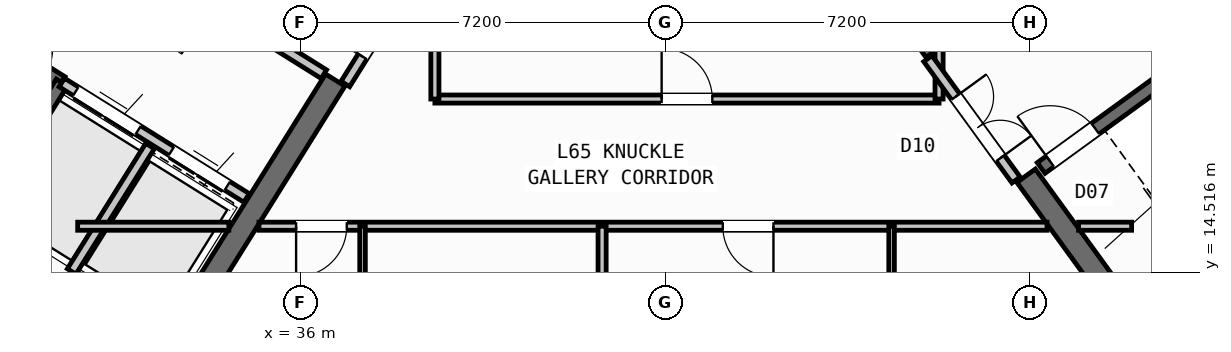
"""IFC4 building model, lengths in metres.
Left out: names, types, materials, properties, quantities, classifications, styles, units other than length and angle.
Written with IfcOpenShell. Run it as: python <this file> out.ifc"""

import sys

from ifc_helpers import new_model, si_unit, direction, frame, frame_2d, origin, place, context, subcontext, project, spatial, rectangle, extrude, source, transform, mapped, element, fill, save


model = new_model("IFC4")
c1 = context("Model", 3, precision=1e-05, world=origin(), true_north=direction((0.0, 1.0)))
c2 = subcontext(c1, "Body", "Model", "MODEL_VIEW")
j1 = project(units=[si_unit("LENGTHUNIT", "METRE"), si_unit("PLANEANGLEUNIT", "RADIAN")], contexts=[c1])
p1 = place(None, origin())
s1 = spatial("IfcSite", under=j1, at=p1, CompositionType="ELEMENT")
p2 = place(p1, origin())
s2 = spatial("IfcBuilding", under=s1, at=p2, CompositionType="ELEMENT")
p3 = place(p2, frame((0.0, 0.0, 259.2)))
s3 = spatial("IfcBuildingStorey", under=s2, at=p3, CompositionType="ELEMENT", Elevation=259.2)
p4 = place(p3, frame((33.324, 12.503, 0.0), z_axis=(0.0, 0.0, 1.0), x_axis=(-0.848043529849, 0.529926571782, 0.0)))
e1 = element("IfcWall", 1, at=p4, inside=s3, PredefinedType="SHEAR", context=c2, shape_type="SweptSolid", body=[
    extrude(rectangle(XDim=13.04, YDim=0.45, at=frame_2d((6.52, 0.0))), origin(), (0.0, 0.0, 1.0), 3.35),
])
p5 = place(p3, frame((36.683, 18.304, 0.0), z_axis=(0.0, 0.0, 1.0), x_axis=(-0.529904039071, -0.848057609704, 0.0)))
e2 = element("IfcWall", 2, at=p5, inside=s3, PredefinedType="SHEAR", context=c2, shape_type="SweptSolid", body=[
    extrude(rectangle(XDim=6.475, YDim=0.45, at=frame_2d((3.238, 0.0))), origin(), (0.0, 0.0, 1.0), 3.35),
])
p6 = place(p3, frame((52.399, 13.169, 0.0), z_axis=(0.0, 0.0, 1.0), x_axis=(0.809022352778, 0.587777877013, 0.0)))
e3 = element("IfcWall", 3, at=p6, inside=s3, PredefinedType="SHEAR", context=c2, shape_type="SweptSolid", body=[
    extrude(rectangle(XDim=12.24, YDim=0.45, at=frame_2d((6.12, 0.0))), origin(), (0.0, 0.0, 1.0), 3.35),
])
p7 = place(p3, frame((52.449, 13.483, 0.0), z_axis=(0.0, 0.0, 1.0), x_axis=(-0.587819244441, 0.808992296542, 0.0)))
e4 = element("IfcWall", 4, at=p7, inside=s3, PredefinedType="SHEAR", context=c2, shape_type="SweptSolid", body=[
    extrude(rectangle(XDim=3.625, YDim=0.45, at=frame_2d((1.812, 0.0))), origin(), (0.0, 0.0, 1.0), 3.35),
])
p8 = place(p3, frame((48.526, 18.884, 0.0), z_axis=(0.0, 0.0, 1.0), x_axis=(-0.587774812919, 0.809024578921, 0.0)))
e5 = element("IfcWall", 5, at=p8, inside=s3, PredefinedType="SHEAR", context=c2, shape_type="SweptSolid", body=[
    extrude(rectangle(XDim=6.475, YDim=0.45, at=frame_2d((3.238, 0.0))), origin(), (0.0, 0.0, 1.0), 3.35),
])
p9 = place(p3, frame((31.28, 18.261, 0.0), z_axis=(0.0, 0.0, 1.0), x_axis=(-0.848051618787, 0.529913626805, 0.0)))
e6 = element("IfcWall", 6, at=p9, inside=s3, PredefinedType="SHEAR", context=c2, shape_type="SweptSolid", body=[
    extrude(rectangle(XDim=7.46, YDim=0.26, at=frame_2d((3.73, 0.0))), origin(), (0.0, 0.0, 1.0), 3.35),
])
p10 = place(p9, frame((0.36, 0.0, 0.0)))
e7 = element("IfcOpeningElement", 7, at=p10, cuts=e6, PredefinedType="OPENING", context=c2, shape_type="SweptSolid", body=[
    extrude(rectangle(XDim=0.86, YDim=2.05, at=frame_2d((0.43, 1.025))), frame((0.0, 0.14, 0.0), z_axis=(0.0, -1.0, 0.0), x_axis=(1.0, 0.0, 0.0)), (0.0, 0.0, 1.0), 0.28),
])
p11 = place(p3, frame((31.288, 18.256, 0.0), z_axis=(0.0, 0.0, 1.0), x_axis=(-0.529943379326, -0.848033026897, 0.0)))
e8 = element("IfcWall", 8, at=p11, inside=s3, PredefinedType="SHEAR", context=c2, shape_type="SweptSolid", body=[
    extrude(rectangle(XDim=3.16, YDim=0.26, at=frame_2d((1.58, 0.0))), origin(), (0.0, 0.0, 1.0), 3.35),
])
p12 = place(p3, frame((34.933, 15.978, 0.0), z_axis=(0.0, 0.0, 1.0), x_axis=(-0.848055739377, 0.529907032327, 0.0)))
e9 = element("IfcWall", 9, at=p12, inside=s3, PredefinedType="STANDARD", context=c2, shape_type="SweptSolid", body=[
    extrude(rectangle(XDim=4.298, YDim=0.2, at=frame_2d((2.149, 0.0))), origin(), (0.0, 0.0, 1.0), 3.34),
])
p13 = place(p12, frame((0.448, 0.0, 0.0)))
e10 = element("IfcOpeningElement", 10, at=p13, cuts=e9, PredefinedType="OPENING", context=c2, shape_type="SweptSolid", body=[
    extrude(rectangle(XDim=1.3, YDim=2.2, at=frame_2d((0.65, 1.1))), frame((0.0, 0.11, 0.0), z_axis=(0.0, -1.0, 0.0), x_axis=(1.0, 0.0, 0.0)), (0.0, 0.0, 1.0), 0.22),
])
p14 = place(p12, frame((2.523, 0.0, 0.0)))
e11 = element("IfcOpeningElement", 11, at=p14, cuts=e9, PredefinedType="OPENING", context=c2, shape_type="SweptSolid", body=[
    extrude(rectangle(XDim=1.45, YDim=2.25, at=frame_2d((0.725, 1.125))), frame((0.0, 0.11, 0.0), z_axis=(0.0, -1.0, 0.0), x_axis=(1.0, 0.0, 0.0)), (0.0, 0.0, 1.0), 0.22),
])
p15 = place(p3, frame((36.459, 18.421, 0.0), z_axis=(0.0, 0.0, 1.0), x_axis=(-0.848059591691, 0.529900867089, 0.0)))
e12 = element("IfcWall", 12, at=p15, inside=s3, PredefinedType="STANDARD", context=c2, shape_type="SweptSolid", body=[
    extrude(rectangle(XDim=5.818, YDim=0.2, at=frame_2d((2.909, 0.0))), origin(), (0.0, 0.0, 1.0), 3.34),
])
p16 = place(p15, frame((2.598, 0.0, 0.0)))
e13 = element("IfcOpeningElement", 13, at=p16, cuts=e12, PredefinedType="OPENING", context=c2, shape_type="SweptSolid", body=[
    extrude(rectangle(XDim=1.15, YDim=2.1, at=frame_2d((0.575, 1.05))), frame((0.0, 0.11, 0.0), z_axis=(0.0, -1.0, 0.0), x_axis=(1.0, 0.0, 0.0)), (0.0, 0.0, 1.0), 0.22),
])
p17 = place(p3, frame((33.029, 17.003, 0.0), z_axis=(0.0, 0.0, 1.0), x_axis=(-0.529916267533, -0.848049968695, 0.0)))
e14 = element("IfcWall", 14, at=p17, inside=s3, PredefinedType="STANDARD", context=c2, shape_type="SweptSolid", body=[
    extrude(rectangle(XDim=2.92, YDim=0.2, at=frame_2d((1.46, 0.0))), origin(), (0.0, 0.0, 1.0), 3.34),
])
p18 = place(p3, frame((52.472, 14.013, 0.0), z_axis=(0.0, 0.0, 1.0), x_axis=(0.809028366311, 0.587769599847, 0.0)))
e15 = element("IfcWall", 15, at=p18, inside=s3, PredefinedType="SHEAR", context=c2, shape_type="SweptSolid", body=[
    extrude(rectangle(XDim=7.33, YDim=0.26, at=frame_2d((3.665, 0.0))), origin(), (0.0, 0.0, 1.0), 3.35),
])
p19 = place(p3, frame((50.615, 16.57, 0.0), z_axis=(0.0, 0.0, 1.0), x_axis=(0.809028366311, 0.587769599847, 0.0)))
e16 = element("IfcWall", 16, at=p19, inside=s3, PredefinedType="SHEAR", context=c2, shape_type="SweptSolid", body=[
    extrude(rectangle(XDim=7.33, YDim=0.26, at=frame_2d((3.665, 0.0))), origin(), (0.0, 0.0, 1.0), 3.35),
])
p20 = place(p19, frame((0.22, 0.0, 0.0)))
e17 = element("IfcOpeningElement", 17, at=p20, cuts=e16, PredefinedType="OPENING", context=c2, shape_type="SweptSolid", body=[
    extrude(rectangle(XDim=1.1, YDim=2.1, at=frame_2d((0.55, 1.05))), frame((0.0, 0.14, 0.0), z_axis=(0.0, -1.0, 0.0), x_axis=(1.0, 0.0, 0.0)), (0.0, 0.0, 1.0), 0.28),
])
p21 = place(p3, frame((32.164, 10.374, 0.0), z_axis=(0.0, 0.0, 1.0), x_axis=(-0.848044107957, 0.529925646633, 0.0)))
e18 = element("IfcWall", 18, at=p21, inside=s3, PredefinedType="PARTITIONING", context=c2, shape_type="SweptSolid", body=[
    extrude(rectangle(XDim=15.57, YDim=0.16, at=frame_2d((7.785, 0.0))), origin(), (0.0, 0.0, 1.0), 3.34),
])
p22 = place(p21, frame((10.83, 0.0, 0.0)))
e19 = element("IfcOpeningElement", 19, at=p22, cuts=e18, PredefinedType="OPENING", context=c2, shape_type="SweptSolid", body=[
    extrude(rectangle(XDim=1.0, YDim=2.1, at=frame_2d((0.5, 1.05))), frame((0.0, 0.09, 0.0), z_axis=(0.0, -1.0, 0.0), x_axis=(1.0, 0.0, 0.0)), (0.0, 0.0, 1.0), 0.18),
])
p23 = place(p3, frame((38.451, 20.737, 0.0), z_axis=(0.0, 0.0, 1.0), x_axis=(-0.529924799939, -0.848044637038, 0.0)))
e20 = element("IfcWall", 20, at=p23, inside=s3, PredefinedType="STANDARD", context=c2, shape_type="SweptSolid", body=[
    extrude(rectangle(XDim=2.96, YDim=0.2, at=frame_2d((1.48, 0.0))), origin(), (0.0, 0.0, 1.0), 3.34),
])
p24 = place(p23, frame((1.46, 0.0, 0.0)))
e21 = element("IfcOpeningElement", 21, at=p24, cuts=e20, PredefinedType="OPENING", context=c2, shape_type="SweptSolid", body=[
    extrude(rectangle(XDim=0.86, YDim=2.05, at=frame_2d((0.43, 1.025))), frame((0.0, 0.11, 0.0), z_axis=(0.0, -1.0, 0.0), x_axis=(1.0, 0.0, 0.0)), (0.0, 0.0, 1.0), 0.22),
])
p25 = place(p3, frame((31.6, 15.42, 0.0), z_axis=(0.0, 0.0, 1.0), x_axis=(1.0, 0.0, 0.0)))
e22 = element("IfcWall", 22, at=p25, inside=s3, PredefinedType="PARTITIONING", context=c2, shape_type="SweptSolid", body=[
    extrude(rectangle(XDim=2.984, YDim=0.16, at=frame_2d((1.492, 0.0))), origin(), (0.0, 0.0, 1.0), 3.34),
])
p26 = place(p3, frame((35.178, 15.42, 0.0), z_axis=(0.0, 0.0, 1.0), x_axis=(1.0, 0.0, 0.0)))
e23 = element("IfcWall", 23, at=p26, inside=s3, PredefinedType="PARTITIONING", context=c2, shape_type="SweptSolid", body=[
    extrude(rectangle(XDim=15.552, YDim=0.16, at=frame_2d((7.776, 0.0))), origin(), (0.0, 0.0, 1.0), 3.34),
])
p27 = place(p26, frame((0.733, 0.0, 0.0)))
e24 = element("IfcOpeningElement", 24, at=p27, cuts=e23, PredefinedType="OPENING", context=c2, shape_type="SweptSolid", body=[
    extrude(rectangle(XDim=1.0, YDim=2.1, at=frame_2d((0.5, 1.05))), frame((0.0, 0.09, 0.0), z_axis=(0.0, -1.0, 0.0), x_axis=(1.0, 0.0, 0.0)), (0.0, 0.0, 1.0), 0.18),
])
p28 = place(p26, frame((9.153, 0.0, 0.0)))
e25 = element("IfcOpeningElement", 25, at=p28, cuts=e23, PredefinedType="OPENING", context=c2, shape_type="SweptSolid", body=[
    extrude(rectangle(XDim=1.0, YDim=2.1, at=frame_2d((0.5, 1.05))), frame((0.0, 0.09, 0.0), z_axis=(0.0, -1.0, 0.0), x_axis=(1.0, 0.0, 0.0)), (0.0, 0.0, 1.0), 0.18),
])
p29 = place(p3, frame((51.354, 15.42, 0.0), z_axis=(0.0, 0.0, 1.0), x_axis=(1.0, 0.0, 0.0)))
e26 = element("IfcWall", 26, at=p29, inside=s3, PredefinedType="PARTITIONING", context=c2, shape_type="SweptSolid", body=[
    extrude(rectangle(XDim=1.046, YDim=0.16, at=frame_2d((0.523, 0.0))), origin(), (0.0, 0.0, 1.0), 3.34),
])
p30 = place(p3, frame((38.65, 17.93, 0.0), z_axis=(0.0, 0.0, 1.0), x_axis=(1.0, 0.0, 0.0)))
e27 = element("IfcWall", 27, at=p30, inside=s3, PredefinedType="PARTITIONING", context=c2, shape_type="SweptSolid", body=[
    extrude(rectangle(XDim=9.95, YDim=0.16, at=frame_2d((4.975, 0.0))), origin(), (0.0, 0.0, 1.0), 3.34),
])
p31 = place(p30, frame((4.475, 0.0, 0.0)))
e28 = element("IfcOpeningElement", 28, at=p31, cuts=e27, PredefinedType="OPENING", context=c2, shape_type="SweptSolid", body=[
    extrude(rectangle(XDim=1.0, YDim=2.1, at=frame_2d((0.5, 1.05))), frame((0.0, 0.09, 0.0), z_axis=(0.0, -1.0, 0.0), x_axis=(1.0, 0.0, 0.0)), (0.0, 0.0, 1.0), 0.18),
])
p32 = place(p3, frame((38.65, 17.93, 0.0), z_axis=(0.0, 0.0, 1.0), x_axis=(0.0, 1.0, 0.0)))
e29 = element("IfcWall", 29, at=p32, inside=s3, PredefinedType="PARTITIONING", context=c2, shape_type="SweptSolid", body=[
    extrude(rectangle(XDim=3.046, YDim=0.16, at=frame_2d((1.523, 0.0))), origin(), (0.0, 0.0, 1.0), 3.34),
])
p33 = place(p3, frame((48.6, 17.93, 0.0), z_axis=(0.0, 0.0, 1.0), x_axis=(0.0, 1.0, 0.0)))
e30 = element("IfcWall", 30, at=p33, inside=s3, PredefinedType="PARTITIONING", context=c2, shape_type="SweptSolid", body=[
    extrude(rectangle(XDim=0.993, YDim=0.16, at=frame_2d((0.496, 0.0))), origin(), (0.0, 0.0, 1.0), 3.34),
])
p34 = place(p3, frame((50.119, 16.333, 0.0), z_axis=(0.0, 0.0, 1.0), x_axis=(-0.587749856981, 0.809042709391, 0.0)))
e31 = element("IfcWall", 31, at=p34, inside=s3, PredefinedType="STANDARD", context=c2, shape_type="SweptSolid", body=[
    extrude(rectangle(XDim=2.96, YDim=0.2, at=frame_2d((1.48, 0.0))), origin(), (0.0, 0.0, 1.0), 3.34),
])
p35 = place(p34, frame((0.53, 0.0, 0.0)))
e32 = element("IfcOpeningElement", 32, at=p35, cuts=e31, PredefinedType="OPENING", context=c2, shape_type="SweptSolid", body=[
    extrude(rectangle(XDim=1.5, YDim=2.15, at=frame_2d((0.75, 1.075))), frame((0.0, 0.11, 0.0), z_axis=(0.0, -1.0, 0.0), x_axis=(1.0, 0.0, 0.0)), (0.0, 0.0, 1.0), 0.22),
])
p36 = place(p3, frame((41.95, 1.96, 0.0), z_axis=(0.0, 0.0, 1.0), x_axis=(0.0, 1.0, 0.0)))
e33 = element("IfcWall", 33, at=p36, inside=s3, PredefinedType="PARTITIONING", context=c2, shape_type="SweptSolid", body=[
    extrude(rectangle(XDim=13.46, YDim=0.16, at=frame_2d((6.73, 0.0))), origin(), (0.0, 0.0, 1.0), 3.34),
])
p37 = place(p3, frame((37.222, 1.96, 0.0), z_axis=(0.0, 0.0, 1.0), x_axis=(0.0, 1.0, 0.0)))
e34 = element("IfcWall", 34, at=p37, inside=s3, PredefinedType="PARTITIONING", context=c2, shape_type="SweptSolid", body=[
    extrude(rectangle(XDim=13.46, YDim=0.11, at=frame_2d((6.73, 0.0))), origin(), (0.0, 0.0, 1.0), 3.34),
])
p38 = place(p37, frame((5.2, 0.0, 0.0)))
e35 = element("IfcOpeningElement", 35, at=p38, cuts=e34, PredefinedType="OPENING", context=c2, shape_type="SweptSolid", body=[
    extrude(rectangle(XDim=0.92, YDim=2.08, at=frame_2d((0.46, 1.04))), frame((0.0, 0.065, 0.0), z_axis=(0.0, -1.0, 0.0), x_axis=(1.0, 0.0, 0.0)), (0.0, 0.0, 1.0), 0.13),
])
p39 = place(p37, frame((10.89, 0.0, 0.0)))
e36 = element("IfcOpeningElement", 36, at=p39, cuts=e34, PredefinedType="OPENING", context=c2, shape_type="SweptSolid", body=[
    extrude(rectangle(XDim=0.88, YDim=2.08, at=frame_2d((0.44, 1.04))), frame((0.0, 0.065, 0.0), z_axis=(0.0, -1.0, 0.0), x_axis=(1.0, 0.0, 0.0)), (0.0, 0.0, 1.0), 0.13),
])
p40 = place(p3, frame((47.663, 1.96, 0.0), z_axis=(0.0, 0.0, 1.0), x_axis=(0.0, 1.0, 0.0)))
e37 = element("IfcWall", 37, at=p40, inside=s3, PredefinedType="PARTITIONING", context=c2, shape_type="SweptSolid", body=[
    extrude(rectangle(XDim=13.46, YDim=0.11, at=frame_2d((6.73, 0.0))), origin(), (0.0, 0.0, 1.0), 3.34),
])
p41 = place(p40, frame((6.3, 0.0, 0.0)))
e38 = element("IfcOpeningElement", 38, at=p41, cuts=e37, PredefinedType="OPENING", context=c2, shape_type="SweptSolid", body=[
    extrude(rectangle(XDim=0.92, YDim=2.08, at=frame_2d((0.46, 1.04))), frame((0.0, 0.065, 0.0), z_axis=(0.0, -1.0, 0.0), x_axis=(1.0, 0.0, 0.0)), (0.0, 0.0, 1.0), 0.13),
])
p42 = place(p40, frame((11.54, 0.0, 0.0)))
e39 = element("IfcOpeningElement", 39, at=p42, cuts=e37, PredefinedType="OPENING", context=c2, shape_type="SweptSolid", body=[
    extrude(rectangle(XDim=0.88, YDim=2.08, at=frame_2d((0.44, 1.04))), frame((0.0, 0.065, 0.0), z_axis=(0.0, -1.0, 0.0), x_axis=(1.0, 0.0, 0.0)), (0.0, 0.0, 1.0), 0.13),
])
m1 = source(origin(), c2, "Body", "SweptSolid", [
    extrude(rectangle(XDim=1.3, YDim=2.2, at=frame_2d((0.65, 1.1))), frame((0.0, 0.025, 0.0), z_axis=(0.0, -1.0, 0.0), x_axis=(1.0, 0.0, 0.0)), (0.0, 0.0, 1.0), 0.05),
])
p43 = place(p13, origin())
e40 = element("IfcDoor", 40, at=p43, inside=s3, OperationType="DOUBLE_DOOR_SLIDING", PredefinedType="DOOR", context=c2, shape_type="MappedRepresentation", body=[
    mapped(m1, transform((0.0, 0.0, 0.0), scale=1.0)),
])
fill(e10, e40)
m2 = source(origin(), c2, "Body", "SweptSolid", [
    extrude(rectangle(XDim=1.45, YDim=2.25, at=frame_2d((0.725, 1.125))), frame((0.0, 0.025, 0.0), z_axis=(0.0, -1.0, 0.0), x_axis=(1.0, 0.0, 0.0)), (0.0, 0.0, 1.0), 0.05),
])
p44 = place(p14, origin())
e41 = element("IfcDoor", 41, at=p44, inside=s3, OperationType="DOUBLE_DOOR_SLIDING", PredefinedType="DOOR", context=c2, shape_type="MappedRepresentation", body=[
    mapped(m2, transform((0.0, 0.0, 0.0), scale=1.0)),
])
fill(e11, e41)
m3 = source(origin(), c2, "Body", "SweptSolid", [
    extrude(rectangle(XDim=1.1, YDim=2.1, at=frame_2d((0.55, 1.05))), frame((0.0, 0.025, 0.0), z_axis=(0.0, -1.0, 0.0), x_axis=(1.0, 0.0, 0.0)), (0.0, 0.0, 1.0), 0.05),
])
p45 = place(p20, origin())
e42 = element("IfcDoor", 42, at=p45, inside=s3, OperationType="SINGLE_SWING_LEFT", PredefinedType="DOOR", context=c2, shape_type="MappedRepresentation", body=[
    mapped(m3, transform((0.0, 0.0, 0.0), scale=1.0)),
])
fill(e17, e42)
m4 = source(origin(), c2, "Body", "SweptSolid", [
    extrude(rectangle(XDim=1.0, YDim=2.1, at=frame_2d((0.5, 1.05))), frame((0.0, 0.025, 0.0), z_axis=(0.0, -1.0, 0.0), x_axis=(1.0, 0.0, 0.0)), (0.0, 0.0, 1.0), 0.05),
])
p46 = place(p31, origin())
e43 = element("IfcDoor", 43, at=p46, inside=s3, OperationType="SINGLE_SWING_LEFT", PredefinedType="DOOR", context=c2, shape_type="MappedRepresentation", body=[
    mapped(m4, transform((0.0, 0.0, 0.0), scale=1.0)),
])
fill(e28, e43)
m5 = source(origin(), c2, "Body", "SweptSolid", [
    extrude(rectangle(XDim=0.86, YDim=2.05, at=frame_2d((0.43, 1.025))), frame((0.0, 0.025, 0.0), z_axis=(0.0, -1.0, 0.0), x_axis=(1.0, 0.0, 0.0)), (0.0, 0.0, 1.0), 0.05),
])
p47 = place(p24, frame((0.86, 0.0, 0.0), z_axis=(0.0, 0.0, 1.0), x_axis=(-1.0, 0.0, 0.0)))
e44 = element("IfcDoor", 44, at=p47, inside=s3, OperationType="SINGLE_SWING_LEFT", PredefinedType="DOOR", context=c2, shape_type="MappedRepresentation", body=[
    mapped(m5, transform((0.0, 0.0, 0.0), scale=1.0)),
])
fill(e21, e44)
m6 = source(origin(), c2, "Body", "SweptSolid", [
    extrude(rectangle(XDim=1.5, YDim=2.15, at=frame_2d((0.75, 1.075))), frame((0.0, 0.025, 0.0), z_axis=(0.0, -1.0, 0.0), x_axis=(1.0, 0.0, 0.0)), (0.0, 0.0, 1.0), 0.05),
])
p48 = place(p35, frame((1.5, 0.0, 0.0), z_axis=(0.0, 0.0, 1.0), x_axis=(-1.0, 0.0, 0.0)))
e45 = element("IfcDoor", 45, at=p48, inside=s3, OperationType="DOUBLE_DOOR_SINGLE_SWING", PredefinedType="DOOR", context=c2, shape_type="MappedRepresentation", body=[
    mapped(m6, transform((0.0, 0.0, 0.0), scale=1.0)),
])
fill(e32, e45)
p49 = place(p27, frame((1.0, 0.0, 0.0), z_axis=(0.0, 0.0, 1.0), x_axis=(-1.0, 0.0, 0.0)))
e46 = element("IfcDoor", 46, at=p49, inside=s3, OperationType="SINGLE_SWING_RIGHT", PredefinedType="DOOR", context=c2, shape_type="MappedRepresentation", body=[
    mapped(m4, transform((0.0, 0.0, 0.0), scale=1.0)),
])
fill(e24, e46)
p50 = place(p28, frame((1.0, 0.0, 0.0), z_axis=(0.0, 0.0, 1.0), x_axis=(-1.0, 0.0, 0.0)))
e47 = element("IfcDoor", 47, at=p50, inside=s3, OperationType="SINGLE_SWING_LEFT", PredefinedType="DOOR", context=c2, shape_type="MappedRepresentation", body=[
    mapped(m4, transform((0.0, 0.0, 0.0), scale=1.0)),
])
fill(e25, e47)
save(model, sys.argv[1])
